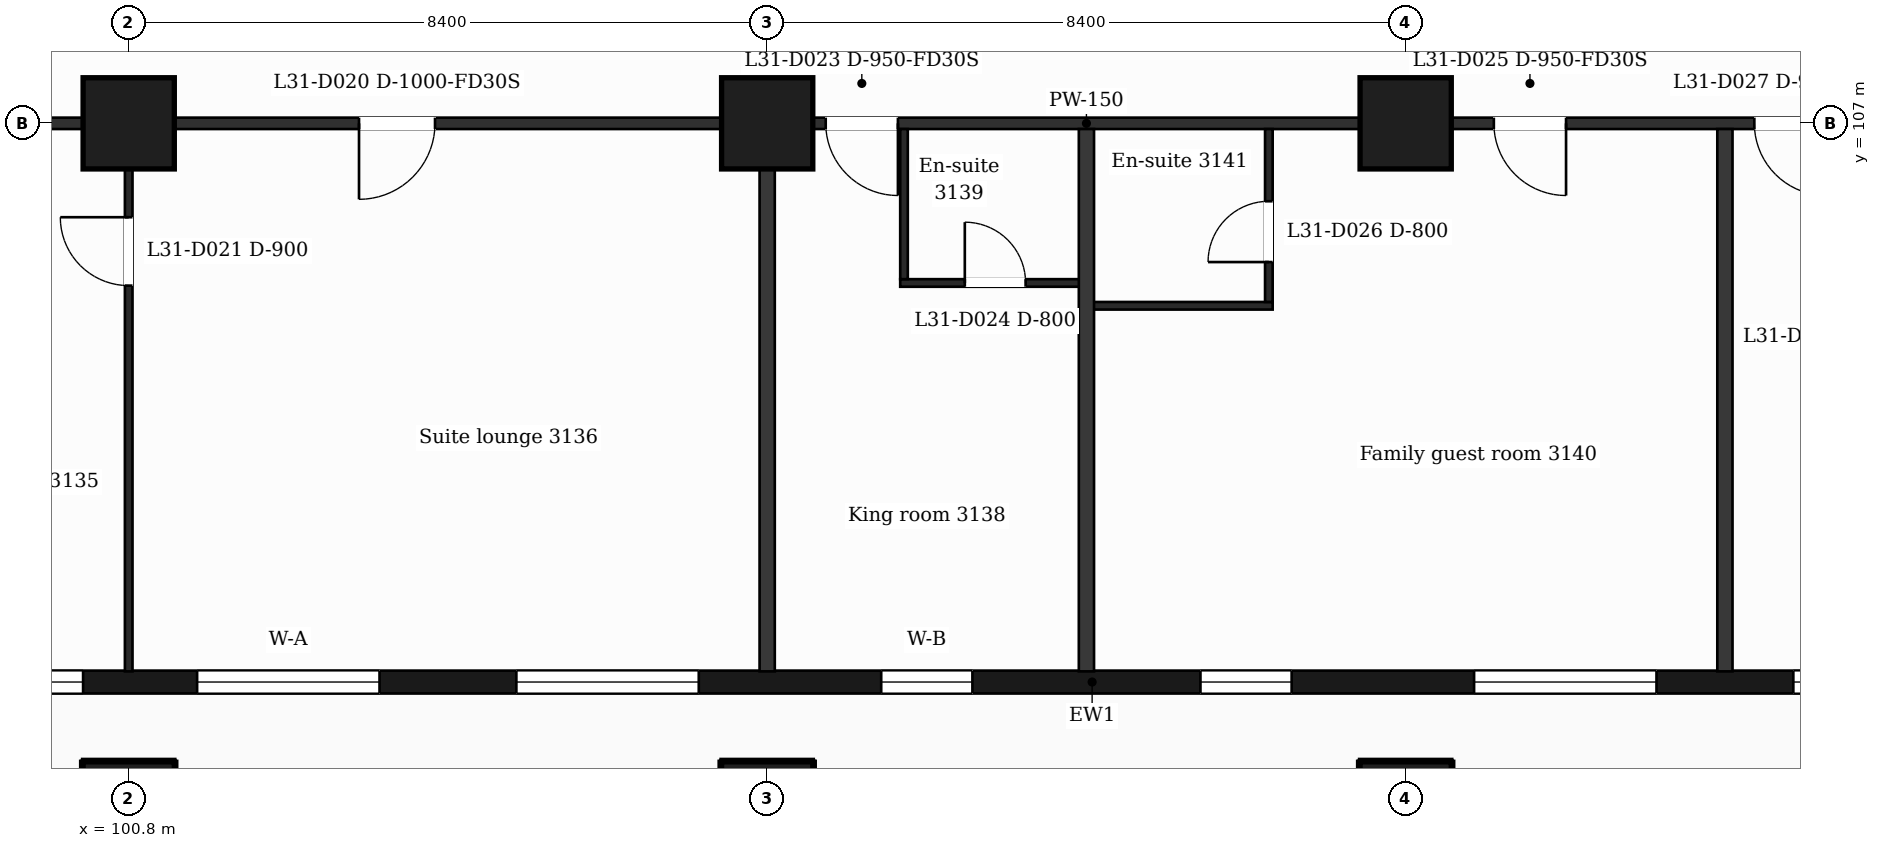
"""IFC4 building model, lengths in metres.
Left out: names, types, materials, properties, quantities, classifications, styles, units other than length and angle.
Written with IfcOpenShell. Run it as: python <this file> out.ifc"""

import sys

from ifc_helpers import new_model, si_unit, direction, frame, frame_2d, origin, origin_2d, place, context, subcontext, project, spatial, rectangle, extrude, element, fill, save


model = new_model("IFC4")
c1 = context("Model", 3, precision=1e-05, world=origin(), true_north=direction((0.0, 1.0)))
c2 = subcontext(c1, "Body", "Model", "MODEL_VIEW")
j1 = project(units=[si_unit("LENGTHUNIT", "METRE"), si_unit("PLANEANGLEUNIT", "RADIAN")], contexts=[c1])
p1 = place(None, origin())
s1 = spatial("IfcSite", under=j1, at=p1, CompositionType="ELEMENT")
p2 = place(p1, origin())
s2 = spatial("IfcBuilding", under=s1, at=p2, CompositionType="ELEMENT")
p3 = place(p2, frame((0.0, 0.0, 131.7)))
s3 = spatial("IfcBuildingStorey", under=s2, at=p3, CompositionType="ELEMENT", Elevation=131.7)
for number, where, z_axis, x_axis in (
    (1, (100.8, 98.0, 0.0), (0.0, 0.0, 1.0), (1.0, 0.0, 0.0)),
    (2, (109.2, 98.0, 0.0), (0.0, 0.0, 1.0), (1.0, 0.0, 0.0)),
    (3, (117.6, 98.0, 0.0), (0.0, 0.0, 1.0), (1.0, 0.0, 0.0)),
    (4, (100.8, 107.0, 0.0), (0.0, 0.0, 1.0), (1.0, 0.0, 0.0)),
    (5, (109.2, 107.0, 0.0), (0.0, 0.0, 1.0), (1.0, 0.0, 0.0)),
    (6, (117.6, 107.0, 0.0), (0.0, 0.0, 1.0), (1.0, 0.0, 0.0)),
):
    element("IfcColumn", number, at=place(p3, frame(where, z_axis=z_axis, x_axis=x_axis)), inside=s3, PredefinedType="COLUMN", context=c2, shape_type="SweptSolid", body=[
        extrude(rectangle(XDim=1.2, YDim=1.2, at=origin_2d()), origin(), (0.0, 0.0, 1.0), 3.7),
    ])
p4 = place(p3, frame((89.85, 99.65, 0.0), z_axis=(0.0, 0.0, 1.0), x_axis=(1.0, 0.0, 0.0)))
e7 = element("IfcWall", 7, at=p4, inside=s3, PredefinedType="SOLIDWALL", context=c2, shape_type="SweptSolid", body=[
    extrude(rectangle(XDim=47.25, YDim=0.3, at=frame_2d((23.625, 0.0))), origin(), (0.0, 0.0, 1.0), 3.2),
])
p5 = place(p4, frame((0.725, 0.0, 0.9)))
e8 = element("IfcOpeningElement", 8, at=p5, cuts=e7, PredefinedType="OPENING", context=c2, shape_type="SweptSolid", body=[
    extrude(rectangle(XDim=1.2, YDim=2.1, at=frame_2d((0.6, 1.05))), frame((0.0, 0.16, 0.0), z_axis=(0.0, -1.0, 0.0), x_axis=(1.0, 0.0, 0.0)), (0.0, 0.0, 1.0), 0.32),
])
p6 = place(p4, frame((3.45, 0.0, 0.9)))
e9 = element("IfcOpeningElement", 9, at=p6, cuts=e7, PredefinedType="OPENING", context=c2, shape_type="SweptSolid", body=[
    extrude(rectangle(XDim=2.4, YDim=2.1, at=frame_2d((1.2, 1.05))), frame((0.0, 0.16, 0.0), z_axis=(0.0, -1.0, 0.0), x_axis=(1.0, 0.0, 0.0)), (0.0, 0.0, 1.0), 0.32),
])
p7 = place(p4, frame((7.35, 0.0, 0.0)))
e10 = element("IfcOpeningElement", 10, at=p7, cuts=e7, PredefinedType="OPENING", context=c2, shape_type="SweptSolid", body=[
    extrude(rectangle(XDim=1.2, YDim=2.4, at=frame_2d((0.6, 1.2))), frame((0.0, 0.16, 0.0), z_axis=(0.0, -1.0, 0.0), x_axis=(1.0, 0.0, 0.0)), (0.0, 0.0, 1.0), 0.32),
])
p8 = place(p4, frame((9.15, 0.0, 0.9)))
e11 = element("IfcOpeningElement", 11, at=p8, cuts=e7, PredefinedType="OPENING", context=c2, shape_type="SweptSolid", body=[
    extrude(rectangle(XDim=1.2, YDim=2.1, at=frame_2d((0.6, 1.05))), frame((0.0, 0.16, 0.0), z_axis=(0.0, -1.0, 0.0), x_axis=(1.0, 0.0, 0.0)), (0.0, 0.0, 1.0), 0.32),
])
p9 = place(p4, frame((11.85, 0.0, 0.9)))
e12 = element("IfcOpeningElement", 12, at=p9, cuts=e7, PredefinedType="OPENING", context=c2, shape_type="SweptSolid", body=[
    extrude(rectangle(XDim=2.4, YDim=2.1, at=frame_2d((1.2, 1.05))), frame((0.0, 0.16, 0.0), z_axis=(0.0, -1.0, 0.0), x_axis=(1.0, 0.0, 0.0)), (0.0, 0.0, 1.0), 0.32),
])
p10 = place(p4, frame((16.05, 0.0, 0.9)))
e13 = element("IfcOpeningElement", 13, at=p10, cuts=e7, PredefinedType="OPENING", context=c2, shape_type="SweptSolid", body=[
    extrude(rectangle(XDim=2.4, YDim=2.1, at=frame_2d((1.2, 1.05))), frame((0.0, 0.16, 0.0), z_axis=(0.0, -1.0, 0.0), x_axis=(1.0, 0.0, 0.0)), (0.0, 0.0, 1.0), 0.32),
])
p11 = place(p4, frame((20.85, 0.0, 0.9)))
e14 = element("IfcOpeningElement", 14, at=p11, cuts=e7, PredefinedType="OPENING", context=c2, shape_type="SweptSolid", body=[
    extrude(rectangle(XDim=1.2, YDim=2.1, at=frame_2d((0.6, 1.05))), frame((0.0, 0.16, 0.0), z_axis=(0.0, -1.0, 0.0), x_axis=(1.0, 0.0, 0.0)), (0.0, 0.0, 1.0), 0.32),
])
p12 = place(p4, frame((25.05, 0.0, 0.9)))
e15 = element("IfcOpeningElement", 15, at=p12, cuts=e7, PredefinedType="OPENING", context=c2, shape_type="SweptSolid", body=[
    extrude(rectangle(XDim=1.2, YDim=2.1, at=frame_2d((0.6, 1.05))), frame((0.0, 0.16, 0.0), z_axis=(0.0, -1.0, 0.0), x_axis=(1.0, 0.0, 0.0)), (0.0, 0.0, 1.0), 0.32),
])
p13 = place(p4, frame((28.65, 0.0, 0.9)))
e16 = element("IfcOpeningElement", 16, at=p13, cuts=e7, PredefinedType="OPENING", context=c2, shape_type="SweptSolid", body=[
    extrude(rectangle(XDim=2.4, YDim=2.1, at=frame_2d((1.2, 1.05))), frame((0.0, 0.16, 0.0), z_axis=(0.0, -1.0, 0.0), x_axis=(1.0, 0.0, 0.0)), (0.0, 0.0, 1.0), 0.32),
])
p14 = place(p4, frame((32.85, 0.0, 0.9)))
e17 = element("IfcOpeningElement", 17, at=p14, cuts=e7, PredefinedType="OPENING", context=c2, shape_type="SweptSolid", body=[
    extrude(rectangle(XDim=2.4, YDim=2.1, at=frame_2d((1.2, 1.05))), frame((0.0, 0.16, 0.0), z_axis=(0.0, -1.0, 0.0), x_axis=(1.0, 0.0, 0.0)), (0.0, 0.0, 1.0), 0.32),
])
p15 = place(p4, frame((37.05, 0.0, 0.9)))
e18 = element("IfcOpeningElement", 18, at=p15, cuts=e7, PredefinedType="OPENING", context=c2, shape_type="SweptSolid", body=[
    extrude(rectangle(XDim=2.4, YDim=2.1, at=frame_2d((1.2, 1.05))), frame((0.0, 0.16, 0.0), z_axis=(0.0, -1.0, 0.0), x_axis=(1.0, 0.0, 0.0)), (0.0, 0.0, 1.0), 0.32),
])
p16 = place(p4, frame((41.25, 0.0, 0.9)))
e19 = element("IfcOpeningElement", 19, at=p16, cuts=e7, PredefinedType="OPENING", context=c2, shape_type="SweptSolid", body=[
    extrude(rectangle(XDim=2.4, YDim=2.1, at=frame_2d((1.2, 1.05))), frame((0.0, 0.16, 0.0), z_axis=(0.0, -1.0, 0.0), x_axis=(1.0, 0.0, 0.0)), (0.0, 0.0, 1.0), 0.32),
])
p17 = place(p4, frame((45.25, 0.0, 0.9)))
e20 = element("IfcOpeningElement", 20, at=p17, cuts=e7, PredefinedType="OPENING", context=c2, shape_type="SweptSolid", body=[
    extrude(rectangle(XDim=1.2, YDim=2.1, at=frame_2d((0.6, 1.05))), frame((0.0, 0.16, 0.0), z_axis=(0.0, -1.0, 0.0), x_axis=(1.0, 0.0, 0.0)), (0.0, 0.0, 1.0), 0.32),
])
p18 = place(p3, frame((113.4, 104.6, 0.0), z_axis=(0.0, 0.0, 1.0), x_axis=(1.0, 0.0, 0.0)))
e21 = element("IfcWall", 21, at=p18, inside=s3, PredefinedType="PARTITIONING", context=c2, shape_type="SweptSolid", body=[
    extrude(rectangle(XDim=2.45, YDim=0.1, at=frame_2d((1.225, 0.0))), origin(), (0.0, 0.0, 1.0), 3.2),
])
p19 = place(p3, frame((110.95, 104.9, 0.0), z_axis=(0.0, 0.0, 1.0), x_axis=(1.0, 0.0, 0.0)))
e22 = element("IfcWall", 22, at=p19, inside=s3, PredefinedType="PARTITIONING", context=c2, shape_type="SweptSolid", body=[
    extrude(rectangle(XDim=2.45, YDim=0.1, at=frame_2d((1.225, 0.0))), origin(), (0.0, 0.0, 1.0), 3.2),
])
p20 = place(p19, frame((0.85, 0.0, 0.0)))
e23 = element("IfcOpeningElement", 23, at=p20, cuts=e22, PredefinedType="OPENING", context=c2, shape_type="SweptSolid", body=[
    extrude(rectangle(XDim=0.8, YDim=2.1, at=frame_2d((0.4, 1.05))), frame((0.0, 0.06, 0.0), z_axis=(0.0, -1.0, 0.0), x_axis=(1.0, 0.0, 0.0)), (0.0, 0.0, 1.0), 0.12),
])
p21 = place(p3, frame((87.018, 107.0, 0.0), z_axis=(0.0, 0.0, 1.0), x_axis=(1.0, 0.0, 0.0)))
e24 = element("IfcWall", 24, at=p21, inside=s3, PredefinedType="PARTITIONING", context=c2, shape_type="SweptSolid", body=[
    extrude(rectangle(XDim=52.765, YDim=0.15, at=frame_2d((26.382, 0.0))), origin(), (0.0, 0.0, 1.0), 3.2),
])
p22 = place(p21, frame((1.276, 0.0, 0.0)))
e25 = element("IfcOpeningElement", 25, at=p22, cuts=e24, PredefinedType="OPENING", context=c2, shape_type="SweptSolid", body=[
    extrude(rectangle(XDim=0.95, YDim=2.1, at=frame_2d((0.475, 1.05))), frame((0.0, 0.085, 0.0), z_axis=(0.0, -1.0, 0.0), x_axis=(1.0, 0.0, 0.0)), (0.0, 0.0, 1.0), 0.17),
])
p23 = place(p21, frame((7.645, 0.0, 0.0)))
e26 = element("IfcOpeningElement", 26, at=p23, cuts=e24, PredefinedType="OPENING", context=c2, shape_type="SweptSolid", body=[
    extrude(rectangle(XDim=0.95, YDim=2.1, at=frame_2d((0.475, 1.05))), frame((0.0, 0.085, 0.0), z_axis=(0.0, -1.0, 0.0), x_axis=(1.0, 0.0, 0.0)), (0.0, 0.0, 1.0), 0.17),
])
p24 = place(p21, frame((16.812, 0.0, 0.0)))
e27 = element("IfcOpeningElement", 27, at=p24, cuts=e24, PredefinedType="OPENING", context=c2, shape_type="SweptSolid", body=[
    extrude(rectangle(XDim=1.0, YDim=2.1, at=frame_2d((0.5, 1.05))), frame((0.0, 0.085, 0.0), z_axis=(0.0, -1.0, 0.0), x_axis=(1.0, 0.0, 0.0)), (0.0, 0.0, 1.0), 0.17),
])
p25 = place(p21, frame((22.952, 0.0, 0.0)))
e28 = element("IfcOpeningElement", 28, at=p25, cuts=e24, PredefinedType="OPENING", context=c2, shape_type="SweptSolid", body=[
    extrude(rectangle(XDim=0.95, YDim=2.1, at=frame_2d((0.475, 1.05))), frame((0.0, 0.085, 0.0), z_axis=(0.0, -1.0, 0.0), x_axis=(1.0, 0.0, 0.0)), (0.0, 0.0, 1.0), 0.17),
])
p26 = place(p21, frame((31.742, 0.0, 0.0)))
e29 = element("IfcOpeningElement", 29, at=p26, cuts=e24, PredefinedType="OPENING", context=c2, shape_type="SweptSolid", body=[
    extrude(rectangle(XDim=0.95, YDim=2.1, at=frame_2d((0.475, 1.05))), frame((0.0, 0.085, 0.0), z_axis=(0.0, -1.0, 0.0), x_axis=(1.0, 0.0, 0.0)), (0.0, 0.0, 1.0), 0.17),
])
p27 = place(p21, frame((35.169, 0.0, 0.0)))
e30 = element("IfcOpeningElement", 30, at=p27, cuts=e24, PredefinedType="OPENING", context=c2, shape_type="SweptSolid", body=[
    extrude(rectangle(XDim=0.95, YDim=2.1, at=frame_2d((0.475, 1.05))), frame((0.0, 0.085, 0.0), z_axis=(0.0, -1.0, 0.0), x_axis=(1.0, 0.0, 0.0)), (0.0, 0.0, 1.0), 0.17),
])
p28 = place(p21, frame((41.807, 0.0, 0.0)))
e31 = element("IfcOpeningElement", 31, at=p28, cuts=e24, PredefinedType="OPENING", context=c2, shape_type="SweptSolid", body=[
    extrude(rectangle(XDim=0.95, YDim=2.1, at=frame_2d((0.475, 1.05))), frame((0.0, 0.085, 0.0), z_axis=(0.0, -1.0, 0.0), x_axis=(1.0, 0.0, 0.0)), (0.0, 0.0, 1.0), 0.17),
])
p29 = place(p21, frame((43.832, 0.0, 0.0)))
e32 = element("IfcOpeningElement", 32, at=p29, cuts=e24, PredefinedType="OPENING", context=c2, shape_type="SweptSolid", body=[
    extrude(rectangle(XDim=0.95, YDim=2.1, at=frame_2d((0.475, 1.05))), frame((0.0, 0.085, 0.0), z_axis=(0.0, -1.0, 0.0), x_axis=(1.0, 0.0, 0.0)), (0.0, 0.0, 1.0), 0.17),
])
p30 = place(p21, frame((48.974, 0.0, 0.0)))
e33 = element("IfcOpeningElement", 33, at=p30, cuts=e24, PredefinedType="OPENING", context=c2, shape_type="SweptSolid", body=[
    extrude(rectangle(XDim=0.95, YDim=2.1, at=frame_2d((0.475, 1.05))), frame((0.0, 0.085, 0.0), z_axis=(0.0, -1.0, 0.0), x_axis=(1.0, 0.0, 0.0)), (0.0, 0.0, 1.0), 0.17),
])
p31 = place(p3, frame((100.8, 99.79, 0.0), z_axis=(0.0, 0.0, 1.0), x_axis=(0.0, 1.0, 0.0)))
e34 = element("IfcWall", 34, at=p31, inside=s3, PredefinedType="PARTITIONING", context=c2, shape_type="SweptSolid", body=[
    extrude(rectangle(XDim=7.135, YDim=0.1, at=frame_2d((3.567, 0.0))), origin(), (0.0, 0.0, 1.0), 3.2),
])
p32 = place(p31, frame((5.075, 0.0, 0.0)))
e35 = element("IfcOpeningElement", 35, at=p32, cuts=e34, PredefinedType="OPENING", context=c2, shape_type="SweptSolid", body=[
    extrude(rectangle(XDim=0.9, YDim=2.1, at=frame_2d((0.45, 1.05))), frame((0.0, 0.06, 0.0), z_axis=(0.0, -1.0, 0.0), x_axis=(1.0, 0.0, 0.0)), (0.0, 0.0, 1.0), 0.12),
])
p33 = place(p3, frame((109.2, 99.79, 0.0), z_axis=(0.0, 0.0, 1.0), x_axis=(0.0, 1.0, 0.0)))
e36 = element("IfcWall", 36, at=p33, inside=s3, PredefinedType="PARTITIONING", context=c2, shape_type="SweptSolid", body=[
    extrude(rectangle(XDim=7.135, YDim=0.2, at=frame_2d((3.567, 0.0))), origin(), (0.0, 0.0, 1.0), 3.2),
])
p34 = place(p3, frame((111.0, 104.95, 0.0), z_axis=(0.0, 0.0, 1.0), x_axis=(0.0, 1.0, 0.0)))
e37 = element("IfcWall", 37, at=p34, inside=s3, PredefinedType="PARTITIONING", context=c2, shape_type="SweptSolid", body=[
    extrude(rectangle(XDim=1.975, YDim=0.1, at=frame_2d((0.988, 0.0))), origin(), (0.0, 0.0, 1.0), 3.2),
])
p35 = place(p3, frame((113.4, 99.79, 0.0), z_axis=(0.0, 0.0, 1.0), x_axis=(0.0, 1.0, 0.0)))
e38 = element("IfcWall", 38, at=p35, inside=s3, PredefinedType="PARTITIONING", context=c2, shape_type="SweptSolid", body=[
    extrude(rectangle(XDim=7.135, YDim=0.2, at=frame_2d((3.567, 0.0))), origin(), (0.0, 0.0, 1.0), 3.2),
])
p36 = place(p3, frame((115.8, 104.65, 0.0), z_axis=(0.0, 0.0, 1.0), x_axis=(0.0, 1.0, 0.0)))
e39 = element("IfcWall", 39, at=p36, inside=s3, PredefinedType="PARTITIONING", context=c2, shape_type="SweptSolid", body=[
    extrude(rectangle(XDim=2.275, YDim=0.1, at=frame_2d((1.138, 0.0))), origin(), (0.0, 0.0, 1.0), 3.2),
])
p37 = place(p36, frame((0.525, 0.0, 0.0)))
e40 = element("IfcOpeningElement", 40, at=p37, cuts=e39, PredefinedType="OPENING", context=c2, shape_type="SweptSolid", body=[
    extrude(rectangle(XDim=0.8, YDim=2.1, at=frame_2d((0.4, 1.05))), frame((0.0, 0.06, 0.0), z_axis=(0.0, -1.0, 0.0), x_axis=(1.0, 0.0, 0.0)), (0.0, 0.0, 1.0), 0.12),
])
p38 = place(p3, frame((121.8, 99.79, 0.0), z_axis=(0.0, 0.0, 1.0), x_axis=(0.0, 1.0, 0.0)))
e41 = element("IfcWall", 41, at=p38, inside=s3, PredefinedType="PARTITIONING", context=c2, shape_type="SweptSolid", body=[
    extrude(rectangle(XDim=7.135, YDim=0.2, at=frame_2d((3.567, 0.0))), origin(), (0.0, 0.0, 1.0), 3.2),
])
p39 = place(p8, origin())
e42 = element("IfcWindow", 42, at=p39, inside=s3, PartitioningType="SINGLE_PANEL", PredefinedType="WINDOW", context=c2, shape_type="SweptSolid", body=[
    extrude(rectangle(XDim=1.2, YDim=2.1, at=frame_2d((0.6, 1.05))), frame((0.0, 0.03, 0.0), z_axis=(0.0, -1.0, 0.0), x_axis=(1.0, 0.0, 0.0)), (0.0, 0.0, 1.0), 0.06),
])
fill(e11, e42)
p40 = place(p9, origin())
e43 = element("IfcWindow", 43, at=p40, inside=s3, PartitioningType="SINGLE_PANEL", PredefinedType="WINDOW", context=c2, shape_type="SweptSolid", body=[
    extrude(rectangle(XDim=2.4, YDim=2.1, at=frame_2d((1.2, 1.05))), frame((0.0, 0.03, 0.0), z_axis=(0.0, -1.0, 0.0), x_axis=(1.0, 0.0, 0.0)), (0.0, 0.0, 1.0), 0.06),
])
fill(e12, e43)
p41 = place(p10, origin())
e44 = element("IfcWindow", 44, at=p41, inside=s3, PartitioningType="SINGLE_PANEL", PredefinedType="WINDOW", context=c2, shape_type="SweptSolid", body=[
    extrude(rectangle(XDim=2.4, YDim=2.1, at=frame_2d((1.2, 1.05))), frame((0.0, 0.03, 0.0), z_axis=(0.0, -1.0, 0.0), x_axis=(1.0, 0.0, 0.0)), (0.0, 0.0, 1.0), 0.06),
])
fill(e13, e44)
p42 = place(p11, origin())
e45 = element("IfcWindow", 45, at=p42, inside=s3, PartitioningType="SINGLE_PANEL", PredefinedType="WINDOW", context=c2, shape_type="SweptSolid", body=[
    extrude(rectangle(XDim=1.2, YDim=2.1, at=frame_2d((0.6, 1.05))), frame((0.0, 0.03, 0.0), z_axis=(0.0, -1.0, 0.0), x_axis=(1.0, 0.0, 0.0)), (0.0, 0.0, 1.0), 0.06),
])
fill(e14, e45)
p43 = place(p12, origin())
e46 = element("IfcWindow", 46, at=p43, inside=s3, PartitioningType="SINGLE_PANEL", PredefinedType="WINDOW", context=c2, shape_type="SweptSolid", body=[
    extrude(rectangle(XDim=1.2, YDim=2.1, at=frame_2d((0.6, 1.05))), frame((0.0, 0.03, 0.0), z_axis=(0.0, -1.0, 0.0), x_axis=(1.0, 0.0, 0.0)), (0.0, 0.0, 1.0), 0.06),
])
fill(e15, e46)
p44 = place(p13, origin())
e47 = element("IfcWindow", 47, at=p44, inside=s3, PartitioningType="SINGLE_PANEL", PredefinedType="WINDOW", context=c2, shape_type="SweptSolid", body=[
    extrude(rectangle(XDim=2.4, YDim=2.1, at=frame_2d((1.2, 1.05))), frame((0.0, 0.03, 0.0), z_axis=(0.0, -1.0, 0.0), x_axis=(1.0, 0.0, 0.0)), (0.0, 0.0, 1.0), 0.06),
])
fill(e16, e47)
p45 = place(p14, origin())
e48 = element("IfcWindow", 48, at=p45, inside=s3, PartitioningType="SINGLE_PANEL", PredefinedType="WINDOW", context=c2, shape_type="SweptSolid", body=[
    extrude(rectangle(XDim=2.4, YDim=2.1, at=frame_2d((1.2, 1.05))), frame((0.0, 0.03, 0.0), z_axis=(0.0, -1.0, 0.0), x_axis=(1.0, 0.0, 0.0)), (0.0, 0.0, 1.0), 0.06),
])
fill(e17, e48)
p46 = place(p24, origin())
e49 = element("IfcDoor", 49, at=p46, inside=s3, OperationType="SINGLE_SWING_LEFT", PredefinedType="DOOR", context=c2, shape_type="SweptSolid", body=[
    extrude(rectangle(XDim=1.0, YDim=2.1, at=frame_2d((0.5, 1.05))), frame((0.0, 0.025, 0.0), z_axis=(0.0, -1.0, 0.0), x_axis=(1.0, 0.0, 0.0)), (0.0, 0.0, 1.0), 0.05),
])
fill(e27, e49)
p47 = place(p32, origin())
e50 = element("IfcDoor", 50, at=p47, inside=s3, OperationType="SINGLE_SWING_RIGHT", PredefinedType="DOOR", context=c2, shape_type="SweptSolid", body=[
    extrude(rectangle(XDim=0.9, YDim=2.1, at=frame_2d((0.45, 1.05))), frame((0.0, 0.025, 0.0), z_axis=(0.0, -1.0, 0.0), x_axis=(1.0, 0.0, 0.0)), (0.0, 0.0, 1.0), 0.05),
])
fill(e35, e50)
p48 = place(p25, origin())
e51 = element("IfcDoor", 51, at=p48, inside=s3, OperationType="SINGLE_SWING_RIGHT", PredefinedType="DOOR", context=c2, shape_type="SweptSolid", body=[
    extrude(rectangle(XDim=0.95, YDim=2.1, at=frame_2d((0.475, 1.05))), frame((0.0, 0.025, 0.0), z_axis=(0.0, -1.0, 0.0), x_axis=(1.0, 0.0, 0.0)), (0.0, 0.0, 1.0), 0.05),
])
fill(e28, e51)
p49 = place(p20, origin())
e52 = element("IfcDoor", 52, at=p49, inside=s3, OperationType="SINGLE_SWING_LEFT", PredefinedType="DOOR", context=c2, shape_type="SweptSolid", body=[
    extrude(rectangle(XDim=0.8, YDim=2.1, at=frame_2d((0.4, 1.05))), frame((0.0, 0.025, 0.0), z_axis=(0.0, -1.0, 0.0), x_axis=(1.0, 0.0, 0.0)), (0.0, 0.0, 1.0), 0.05),
])
fill(e23, e52)
p50 = place(p26, origin())
e53 = element("IfcDoor", 53, at=p50, inside=s3, OperationType="SINGLE_SWING_RIGHT", PredefinedType="DOOR", context=c2, shape_type="SweptSolid", body=[
    extrude(rectangle(XDim=0.95, YDim=2.1, at=frame_2d((0.475, 1.05))), frame((0.0, 0.025, 0.0), z_axis=(0.0, -1.0, 0.0), x_axis=(1.0, 0.0, 0.0)), (0.0, 0.0, 1.0), 0.05),
])
fill(e29, e53)
p51 = place(p37, origin())
e54 = element("IfcDoor", 54, at=p51, inside=s3, OperationType="SINGLE_SWING_LEFT", PredefinedType="DOOR", context=c2, shape_type="SweptSolid", body=[
    extrude(rectangle(XDim=0.8, YDim=2.1, at=frame_2d((0.4, 1.05))), frame((0.0, 0.025, 0.0), z_axis=(0.0, -1.0, 0.0), x_axis=(1.0, 0.0, 0.0)), (0.0, 0.0, 1.0), 0.05),
])
fill(e40, e54)
p52 = place(p27, origin())
e55 = element("IfcDoor", 55, at=p52, inside=s3, OperationType="SINGLE_SWING_RIGHT", PredefinedType="DOOR", context=c2, shape_type="SweptSolid", body=[
    extrude(rectangle(XDim=0.95, YDim=2.1, at=frame_2d((0.475, 1.05))), frame((0.0, 0.025, 0.0), z_axis=(0.0, -1.0, 0.0), x_axis=(1.0, 0.0, 0.0)), (0.0, 0.0, 1.0), 0.05),
])
fill(e30, e55)
save(model, sys.argv[1])
